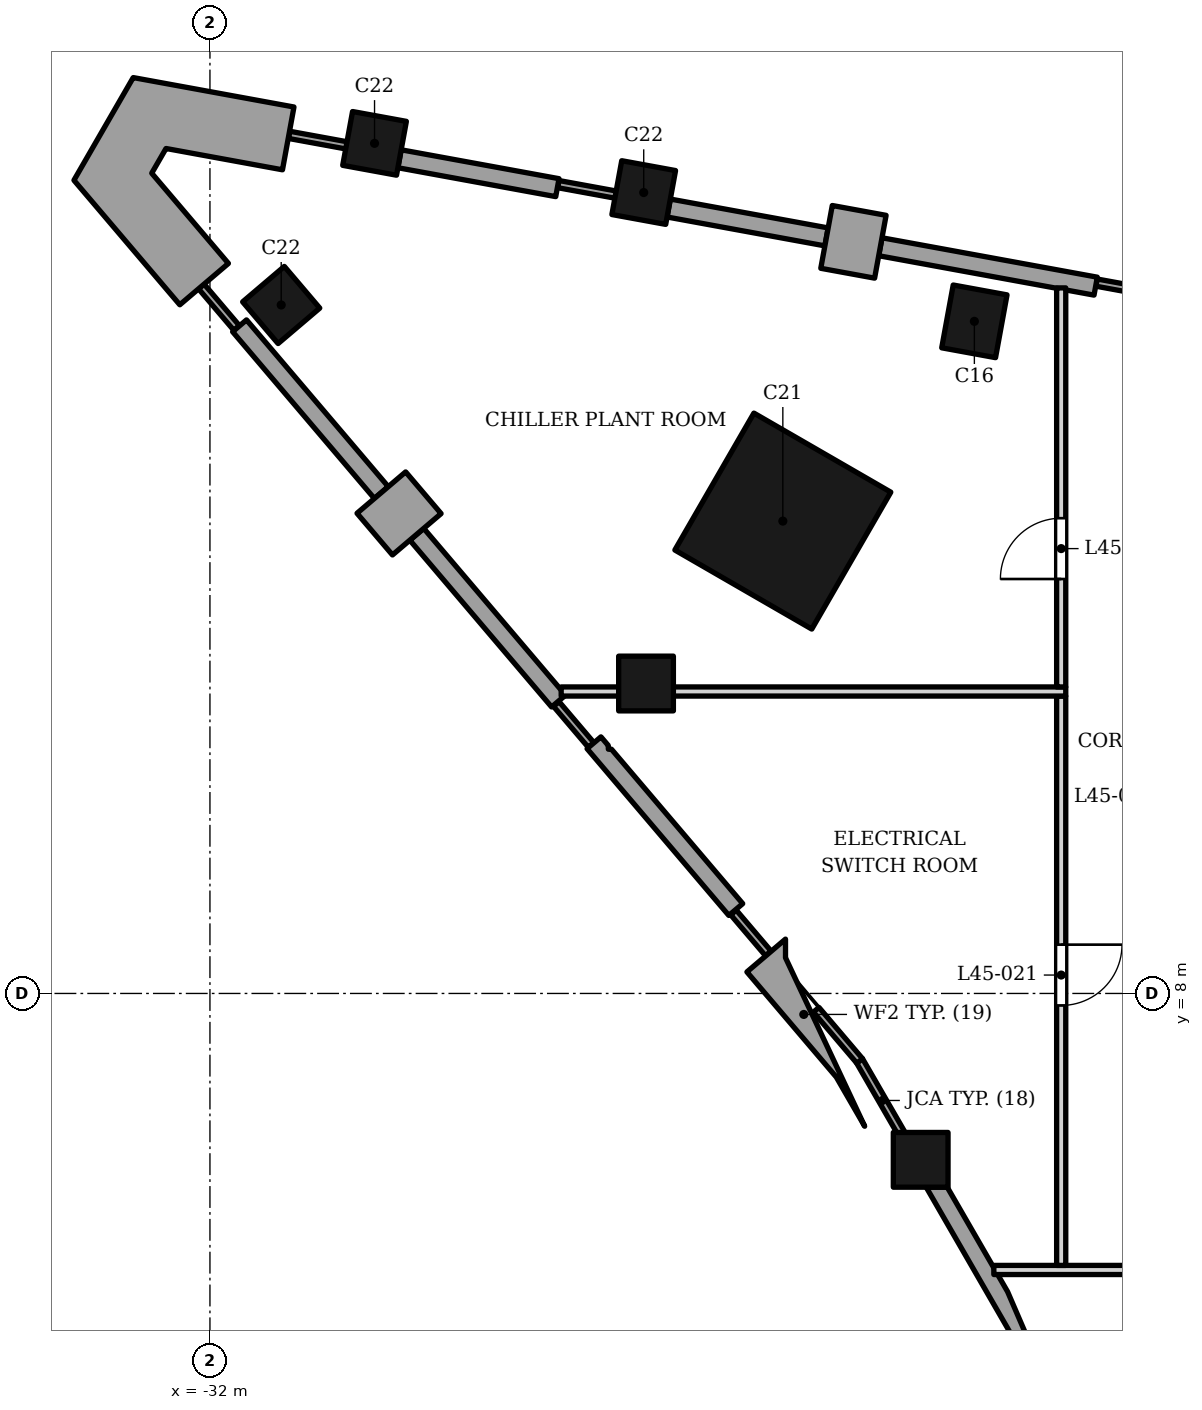
"""IFC4 building model, lengths in metres.
Left out: names, types, materials, properties, quantities, classifications, styles, units other than length and angle.
Written with IfcOpenShell. Run it as: python <this file> out.ifc"""

import sys

from ifc_helpers import new_model, si_unit, direction, frame, frame_2d, origin, origin_2d, place, context, subcontext, project, spatial, polyline, rectangle, outline, extrude, clip, halfspace, element, fill, save


model = new_model("IFC4")
c1 = context("Model", 3, precision=1e-05, world=origin(), true_north=direction((0.0, 1.0)))
c2 = subcontext(c1, "Body", "Model", "MODEL_VIEW")
j1 = project(units=[si_unit("LENGTHUNIT", "METRE"), si_unit("PLANEANGLEUNIT", "RADIAN")], contexts=[c1])
p1 = place(None, origin())
s1 = spatial("IfcSite", under=j1, at=p1, CompositionType="ELEMENT")
p2 = place(p1, origin())
s2 = spatial("IfcBuilding", under=s1, at=p2, CompositionType="ELEMENT")
p3 = place(p2, frame((0.0, 0.0, 191.4)))
s3 = spatial("IfcBuildingStorey", under=s2, at=p3, CompositionType="ELEMENT", Elevation=191.4)
p4 = place(p3, frame((-19.428, 19.053, 0.0), z_axis=(0.0, 0.0, 1.0), x_axis=(-0.983669930074, 0.179981856499, 0.0)))
e1 = element("IfcColumn", 1, at=p4, inside=s3, PredefinedType="COLUMN", context=c2, shape_type="SweptSolid", body=[
    extrude(rectangle(XDim=0.9, YDim=1.05, at=origin_2d()), origin(), (0.0, 0.0, 1.0), 5.0),
])
p5 = place(p3, frame((-22.578, 15.768, 0.0), z_axis=(0.0, 0.0, 1.0), x_axis=(0.866025421238, -0.49999996977, 0.0)))
e2 = element("IfcColumn", 2, at=p5, inside=s3, PredefinedType="COLUMN", context=c2, shape_type="SweptSolid", body=[
    extrude(rectangle(XDim=2.6, YDim=2.6, at=origin_2d()), origin(), (0.0, 0.0, 1.0), 5.0),
])
for number, where, z_axis, x_axis in (
    (3, (-24.866, 21.171, 0.0), (0.0, 0.0, 1.0), (-0.984, 0.18, 0.0)),
    (4, (-29.293, 21.98, 0.0), (0.0, 0.0, 1.0), (-0.984, 0.18, 0.0)),
    (5, (-30.828, 19.322, 0.0), (0.0, 0.0, 1.0), (0.648, -0.762, 0.0)),
):
    element("IfcColumn", number, at=place(p3, frame(where, z_axis=z_axis, x_axis=x_axis)), inside=s3, PredefinedType="COLUMN", context=c2, shape_type="SweptSolid", body=[
        extrude(rectangle(XDim=0.9, YDim=0.9, at=origin_2d()), origin(), (0.0, 0.0, 1.0), 5.0),
    ])
p6 = place(p3, frame((-15.717, -2.751, 0.0), z_axis=(-0.33011858032, 0.765685342742, 0.552039562746), x_axis=(-0.918288424584, -0.395912072656, 0.0)))
e6 = element("IfcColumn", 6, at=p6, inside=s3, PredefinedType="COLUMN", context=c2, shape_type="Clipping", body=[
    clip(clip(extrude(rectangle(XDim=0.9, YDim=0.9, at=origin_2d()), origin(), (0.0, 0.0, 1.0), 9.057), halfspace(frame((0.0, 0.0, 0.687), z_axis=(0.0, 0.0, 1.0), x_axis=(1.0, 0.0, 0.0)), True)), halfspace(frame((0.0, 0.0, 8.37), z_axis=(0.0, 0.0, 1.0), x_axis=(1.0, 0.0, 0.0)), False)),
])
p7 = place(p3, frame((-24.828, 13.097, 0.0), z_axis=(-0.033747087342, -0.124917482557, 0.991593039834), x_axis=(0.965391406589, -0.260805352865, 0.0)))
e7 = element("IfcColumn", 7, at=p7, inside=s3, PredefinedType="COLUMN", context=c2, shape_type="Clipping", body=[
    clip(clip(extrude(rectangle(XDim=0.9, YDim=0.9, at=origin_2d()), origin(), (0.0, 0.0, 1.0), 5.042), halfspace(frame((0.0, 0.0, 0.063), z_axis=(0.0, 0.0, 1.0), x_axis=(1.0, 0.0, 0.0)), True)), halfspace(frame((0.0, 0.0, 4.979), z_axis=(0.0, 0.0, 1.0), x_axis=(1.0, 0.0, 0.0)), False)),
])
p8 = place(p3, frame((-20.311, 5.264, 0.0), z_axis=(-0.272341668224, 0.579597973342, 0.768047007055), x_axis=(-0.905065403583, -0.425272401218, 0.0)))
e8 = element("IfcColumn", 8, at=p8, inside=s3, PredefinedType="COLUMN", context=c2, shape_type="Clipping", body=[
    clip(clip(extrude(rectangle(XDim=0.9, YDim=0.9, at=origin_2d()), origin(), (0.0, 0.0, 1.0), 6.51), halfspace(frame((0.0, 0.0, 0.38), z_axis=(0.0, 0.0, 1.0), x_axis=(1.0, 0.0, 0.0)), True)), halfspace(frame((0.0, 0.0, 6.13), z_axis=(0.0, 0.0, 1.0), x_axis=(1.0, 0.0, 0.0)), False)),
])
p9 = place(p3, origin())
e9 = element("IfcWall", 9, at=p9, inside=s3, PredefinedType="ELEMENTEDWALL", context=c2, shape_type="SweptSolid", body=[
    extrude(outline(polyline([(-18.578, 1.969), (-18.432, 2.053), (-18.882, 3.095), (-19.874, 4.814), (-20.22, 4.814), (-18.578, 1.969)])), origin(), (0.0, 0.0, 1.0), 3.5),
])
p10 = place(p3, frame((-21.511, 19.844, 0.0), z_axis=(0.0, 0.0, 1.0), x_axis=(0.179990382599, 0.983668370017, 0.0)))
e10 = element("IfcWall", 10, at=p10, inside=s3, PredefinedType="SOLIDWALL", context=c2, shape_type="SweptSolid", body=[
    extrude(rectangle(XDim=1.05, YDim=0.9, at=frame_2d((0.525, 0.0))), origin(), (0.0, 0.0, 1.0), 3.5),
])
p11 = place(p3, frame((-17.433, 19.632, 0.0), z_axis=(0.0, 0.0, 1.0), x_axis=(-0.983669647318, 0.17998340186, 0.0)))
e11 = element("IfcWall", 11, at=p11, inside=s3, PredefinedType="ELEMENTEDWALL", context=c2, shape_type="SweptSolid", body=[
    extrude(rectangle(XDim=3.6, YDim=0.3, at=frame_2d((1.8, 0.0))), origin(), (0.0, 0.0, 1.0), 3.5),
])
p12 = place(p3, origin())
e12 = element("IfcWall", 12, at=p12, inside=s3, PredefinedType="ELEMENTEDWALL", context=c2, shape_type="SweptSolid", body=[
    extrude(outline(polyline([(-21.833, 20.589), (-24.428, 21.064), (-24.482, 20.769), (-21.886, 20.294), (-21.833, 20.589)])), origin(), (0.0, 0.0, 1.0), 3.5),
])
p13 = place(p3, origin())
e13 = element("IfcWall", 13, at=p13, inside=s3, PredefinedType="ELEMENTEDWALL", context=c2, shape_type="SweptSolid", body=[
    extrude(outline(polyline([(-26.259, 21.399), (-28.855, 21.874), (-28.909, 21.579), (-26.313, 21.104), (-26.259, 21.399)])), origin(), (0.0, 0.0, 1.0), 3.5),
])
p14 = place(p3, frame((-28.49, 16.234, 0.0), z_axis=(0.0, 0.0, 1.0), x_axis=(-0.761990950504, -0.647587670783, 0.0)))
e14 = element("IfcWall", 14, at=p14, inside=s3, PredefinedType="SOLIDWALL", context=c2, shape_type="SweptSolid", body=[
    extrude(rectangle(XDim=1.05, YDim=0.9, at=frame_2d((0.525, 0.0))), origin(), (0.0, 0.0, 1.0), 3.5),
])
for number, where, z_axis, x_axis in (
    (15, (-31.513, 18.979, 0.0), (0.0, 0.0, 1.0), (0.648, -0.762, 0.0)),
    (16, (-28.598, 15.551, 0.0), (0.0, 0.0, 1.0), (0.648, -0.762, 0.0)),
):
    element("IfcWall", number, at=place(p3, frame(where, z_axis=z_axis, x_axis=x_axis)), inside=s3, PredefinedType="ELEMENTEDWALL", context=c2, shape_type="SweptSolid", body=[
        extrude(rectangle(XDim=3.6, YDim=0.3, at=frame_2d((1.8, 0.0))), origin(), (0.0, 0.0, 1.0), 3.5),
    ])
p15 = place(p3, origin())
e17 = element("IfcWall", 17, at=p15, inside=s3, PredefinedType="ELEMENTEDWALL", context=c2, shape_type="SweptSolid", body=[
    extrude(outline(polyline([(-23.238, 9.477), (-25.397, 12.017), (-25.448, 12.017), (-25.448, 12.077), (-25.569, 12.22), (-25.798, 12.025), (-23.466, 9.283), (-23.238, 9.477)])), origin(), (0.0, 0.0, 1.0), 3.5),
])
p16 = place(p3, origin())
e18 = element("IfcWall", 18, at=p16, inside=s3, PredefinedType="SOLIDWALL", context=c2, shape_type="SweptSolid", body=[
    extrude(outline(polyline([(-30.807, 21.545), (-30.618, 22.578), (-33.262, 23.062), (-34.237, 21.373), (-32.496, 19.325), (-31.696, 20.005), (-32.957, 21.489), (-32.723, 21.896), (-30.807, 21.545)])), origin(), (0.0, 0.0, 1.0), 3.5),
])
p17 = place(p3, origin())
e19 = element("IfcWall", 19, at=p17, inside=s3, PredefinedType="SOLIDWALL", context=c2, shape_type="SweptSolid", body=[
    extrude(outline(polyline([(-22.534, 8.894), (-23.169, 8.354), (-21.699, 6.625), (-21.232, 5.816), (-22.534, 8.587), (-22.534, 8.894)])), origin(), (0.0, 0.0, 1.0), 3.5),
])
p18 = place(p3, frame((-21.32, 6.898, 0.0), z_axis=(0.0, 0.0, 1.0), x_axis=(0.499991248344, -0.866030456496, 0.0)))
e20 = element("IfcWall", 20, at=p18, inside=s3, PredefinedType="SOLIDWALL", context=c2, shape_type="SweptSolid", body=[
    extrude(rectangle(XDim=1.52, YDim=0.12, at=frame_2d((0.76, 0.0))), origin(), (0.0, 0.0, 1.0), 3.5),
])
p19 = place(p3, frame((-16.535, 19.528, 0.0), z_axis=(0.0, 0.0, 1.0), x_axis=(-0.983669189359, 0.179985904742, 0.0)))
e21 = element("IfcWall", 21, at=p19, inside=s3, PredefinedType="SOLIDWALL", context=c2, shape_type="SweptSolid", body=[
    extrude(rectangle(XDim=0.898, YDim=0.12, at=frame_2d((0.449, 0.0))), origin(), (0.0, 0.0, 1.0), 3.5),
])
for number, where, z_axis, x_axis in (
    (22, (-25.254, 21.124, 0.0), (0.0, 0.0, 1.0), (-0.984, 0.18, 0.0)),
    (23, (-30.698, 22.12, 0.0), (0.0, 0.0, 1.0), (0.984, -0.18, 0.0)),
):
    element("IfcWall", number, at=place(p3, frame(where, z_axis=z_axis, x_axis=x_axis)), inside=s3, PredefinedType="SOLIDWALL", context=c2, shape_type="SweptSolid", body=[
        extrude(rectangle(XDim=1.034, YDim=0.12, at=frame_2d((0.517, 0.0))), origin(), (0.0, 0.0, 1.0), 3.5),
    ])
p20 = place(p3, frame((-32.143, 19.628, 0.0), z_axis=(0.0, 0.0, 1.0), x_axis=(0.647695776624, -0.761899062175, 0.0)))
e24 = element("IfcWall", 24, at=p20, inside=s3, PredefinedType="SOLIDWALL", context=c2, shape_type="SweptSolid", body=[
    extrude(rectangle(XDim=0.898, YDim=0.12, at=frame_2d((0.449, 0.0))), origin(), (0.0, 0.0, 1.0), 3.5),
])
for number, where, z_axis, x_axis in (
    (25, (-25.732, 12.087, 0.0), (0.0, 0.0, 1.0), (-0.648, 0.762, 0.0)),
    (26, (-22.817, 8.658, 0.0), (0.0, 0.0, 1.0), (-0.648, 0.762, 0.0)),
):
    element("IfcWall", number, at=place(p3, frame(where, z_axis=z_axis, x_axis=x_axis)), inside=s3, PredefinedType="SOLIDWALL", context=c2, shape_type="SweptSolid", body=[
        extrude(rectangle(XDim=0.884, YDim=0.12, at=frame_2d((0.442, 0.0))), origin(), (0.0, 0.0, 1.0), 3.5),
    ])
p21 = place(p3, frame((-21.313, 6.889, 0.0), z_axis=(0.0, 0.0, 1.0), x_axis=(-0.64782151166, 0.761792156057, 0.0)))
e27 = element("IfcWall", 27, at=p21, inside=s3, PredefinedType="SOLIDWALL", context=c2, shape_type="SweptSolid", body=[
    extrude(rectangle(XDim=1.105, YDim=0.12, at=frame_2d((0.553, 0.0))), origin(), (0.0, 0.0, 1.0), 3.5),
])
p22 = place(p3, frame((-19.108, 3.453, 0.0), z_axis=(0.0, 0.0, 1.0), x_axis=(1.0, 0.0, 0.0)))
e28 = element("IfcWall", 28, at=p22, inside=s3, PredefinedType="PARTITIONING", context=c2, shape_type="SweptSolid", body=[
    extrude(rectangle(XDim=20.313, YDim=0.15, at=frame_2d((10.156, 0.0))), origin(), (0.0, 0.0, 1.0), 3.752),
])
p23 = place(p22, frame((12.108, 0.0, 0.0)))
e29 = element("IfcOpeningElement", 29, at=p23, cuts=e28, PredefinedType="OPENING", context=c2, shape_type="SweptSolid", body=[
    extrude(rectangle(XDim=1.0, YDim=2.1, at=frame_2d((0.5, 1.05))), frame((0.0, 0.085, 0.0), z_axis=(0.0, -1.0, 0.0), x_axis=(1.0, 0.0, 0.0)), (0.0, 0.0, 1.0), 0.17),
])
p24 = place(p3, frame((-18.0, 3.528, 0.0), z_axis=(0.0, 0.0, 1.0), x_axis=(0.0, 1.0, 0.0)))
e30 = element("IfcWall", 30, at=p24, inside=s3, PredefinedType="PARTITIONING", context=c2, shape_type="SweptSolid", body=[
    extrude(rectangle(XDim=9.363, YDim=0.15, at=frame_2d((4.682, 0.0))), origin(), (0.0, 0.0, 1.0), 3.752),
])
p25 = place(p24, frame((4.275, 0.0, 0.0)))
e31 = element("IfcOpeningElement", 31, at=p25, cuts=e30, PredefinedType="OPENING", context=c2, shape_type="SweptSolid", body=[
    extrude(rectangle(XDim=1.0, YDim=2.1, at=frame_2d((0.5, 1.05))), frame((0.0, 0.085, 0.0), z_axis=(0.0, -1.0, 0.0), x_axis=(1.0, 0.0, 0.0)), (0.0, 0.0, 1.0), 0.17),
])
p26 = place(p3, frame((-26.223, 12.966, 0.0), z_axis=(0.0, 0.0, 1.0), x_axis=(1.0, 0.0, 0.0)))
e32 = element("IfcWall", 32, at=p26, inside=s3, PredefinedType="PARTITIONING", context=c2, shape_type="SweptSolid", body=[
    extrude(rectangle(XDim=8.298, YDim=0.15, at=frame_2d((4.149, 0.0))), origin(), (0.0, 0.0, 1.0), 3.752),
])
p27 = place(p3, frame((-18.0, 13.041, 0.0), z_axis=(0.0, 0.0, 1.0), x_axis=(0.0, 1.0, 0.0)))
e33 = element("IfcWall", 33, at=p27, inside=s3, PredefinedType="PARTITIONING", context=c2, shape_type="SweptSolid", body=[
    extrude(rectangle(XDim=6.562, YDim=0.15, at=frame_2d((3.281, 0.0))), origin(), (0.0, 0.0, 1.0), 4.074),
])
p28 = place(p27, frame((1.775, 0.0, 0.0)))
e34 = element("IfcOpeningElement", 34, at=p28, cuts=e33, PredefinedType="OPENING", context=c2, shape_type="SweptSolid", body=[
    extrude(rectangle(XDim=1.0, YDim=2.1, at=frame_2d((0.5, 1.05))), frame((0.0, 0.085, 0.0), z_axis=(0.0, -1.0, 0.0), x_axis=(1.0, 0.0, 0.0)), (0.0, 0.0, 1.0), 0.17),
])
p29 = place(p28, origin())
e35 = element("IfcDoor", 35, at=p29, inside=s3, OperationType="SINGLE_SWING_LEFT", PredefinedType="DOOR", context=c2, shape_type="SweptSolid", body=[
    extrude(rectangle(XDim=1.0, YDim=2.1, at=frame_2d((0.5, 1.05))), frame((0.0, 0.025, 0.0), z_axis=(0.0, -1.0, 0.0), x_axis=(1.0, 0.0, 0.0)), (0.0, 0.0, 1.0), 0.05),
])
fill(e34, e35)
p30 = place(p25, origin())
e36 = element("IfcDoor", 36, at=p30, inside=s3, OperationType="SINGLE_SWING_RIGHT", PredefinedType="DOOR", context=c2, shape_type="SweptSolid", body=[
    extrude(rectangle(XDim=1.0, YDim=2.1, at=frame_2d((0.5, 1.05))), frame((0.0, 0.025, 0.0), z_axis=(0.0, -1.0, 0.0), x_axis=(1.0, 0.0, 0.0)), (0.0, 0.0, 1.0), 0.05),
])
fill(e31, e36)
save(model, sys.argv[1])
